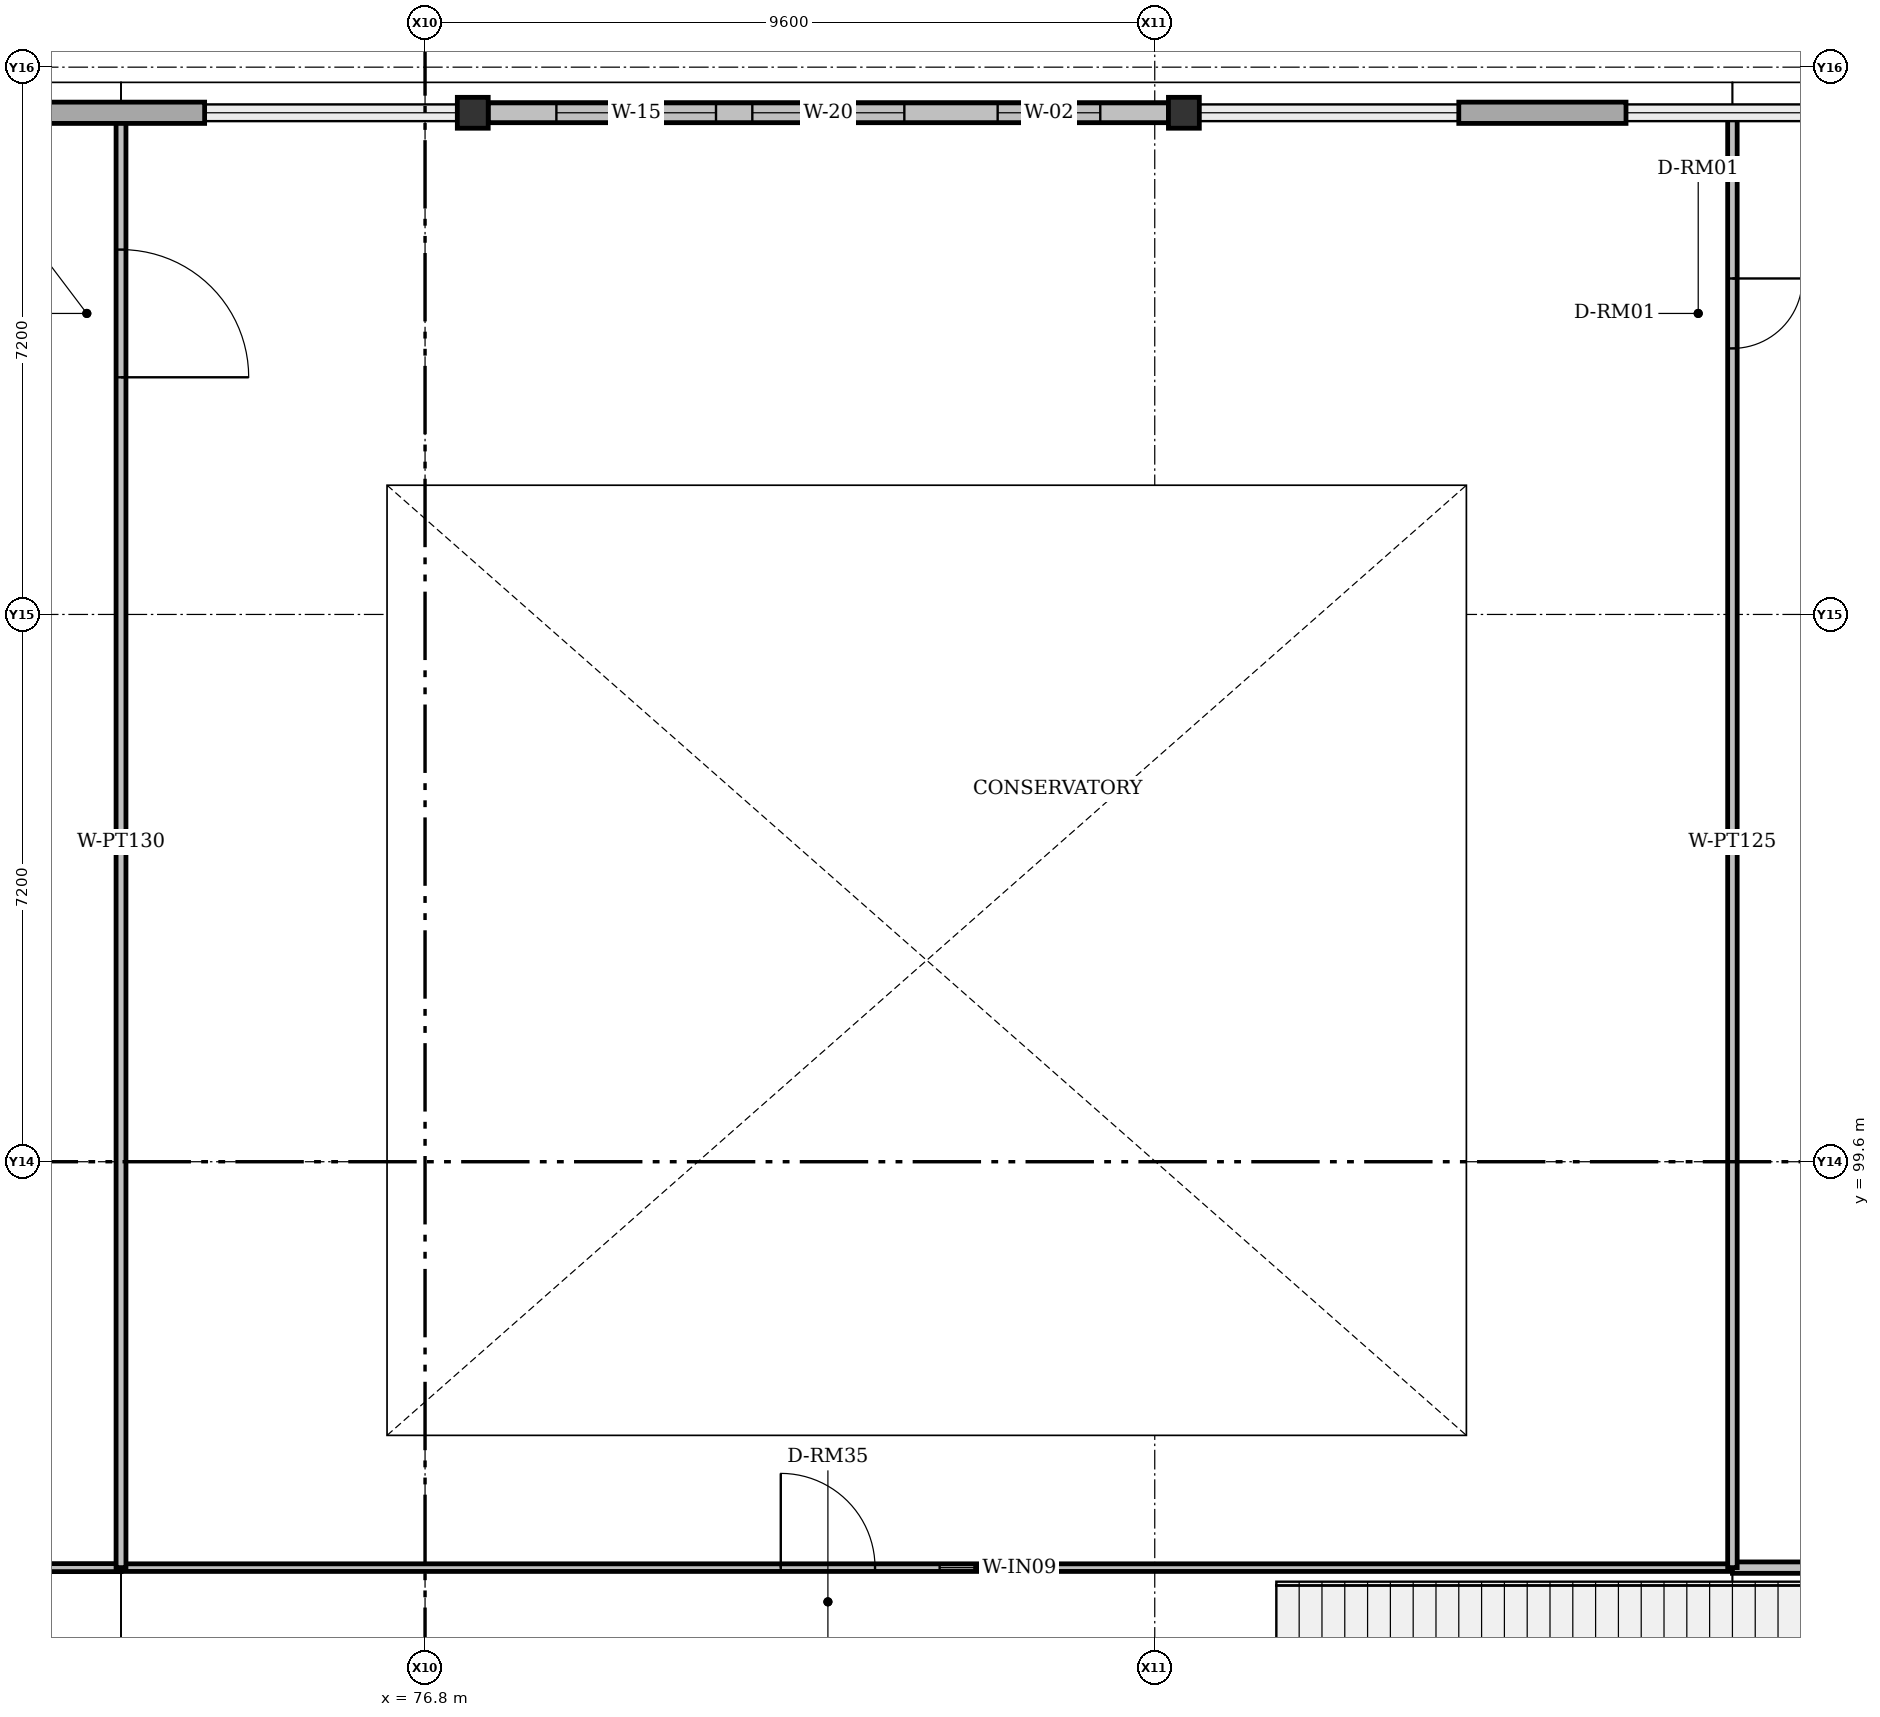
"""IFC4 building model, lengths in metres.
Left out: names, types, materials, properties, quantities, classifications, styles, units other than length and angle.
Written with IfcOpenShell. Run it as: python <this file> out.ifc"""

import sys

from ifc_helpers import new_model, si_unit, direction, frame, frame_2d, origin, origin_2d, place, context, subcontext, project, spatial, rectangle, hollow_circle, extrude, element, fill, save


model = new_model("IFC4")
c1 = context("Model", 3, precision=1e-05, world=origin(), true_north=direction((0.0, 1.0)))
c2 = subcontext(c1, "Body", "Model", "MODEL_VIEW")
j1 = project(units=[si_unit("LENGTHUNIT", "METRE"), si_unit("PLANEANGLEUNIT", "RADIAN")], contexts=[c1])
p1 = place(None, origin())
s1 = spatial("IfcSite", under=j1, at=p1, CompositionType="ELEMENT")
p2 = place(p1, origin())
s2 = spatial("IfcBuilding", under=s1, at=p2, CompositionType="ELEMENT")
p3 = place(p2, origin())
s3 = spatial("IfcBuildingStorey", under=s2, at=p3, CompositionType="ELEMENT", Elevation=0.0)
for number, where, z_axis, x_axis in (
    (1, (77.428, 113.4, 0.0), (0.0, 0.0, 1.0), (1.0, 0.0, 0.0)),
    (2, (86.783, 113.4, 0.0), (0.0, 0.0, 1.0), (1.0, 0.0, 0.0)),
):
    element("IfcColumn", number, at=place(p3, frame(where, z_axis=z_axis, x_axis=x_axis)), inside=s3, PredefinedType="COLUMN", context=c2, shape_type="SweptSolid", body=[
        extrude(hollow_circle(Radius=0.203, WallThickness=0.016, at=origin_2d()), origin(), (0.0, 0.0, 1.0), 5.4),
    ])
p4 = place(p3, frame((77.629, 113.4, 0.0), z_axis=(0.0, 0.0, 1.0), x_axis=(1.0, 0.0, 0.0)))
e3 = element("IfcWall", 3, at=p4, inside=s3, PredefinedType="SOLIDWALL", context=c2, shape_type="SweptSolid", body=[
    extrude(rectangle(XDim=8.953, YDim=0.26, at=frame_2d((4.477, 0.0))), origin(), (0.0, 0.0, 1.0), 3.383),
])
p5 = place(p4, frame((0.899, 0.0, 0.92)))
e4 = element("IfcOpeningElement", 4, at=p5, cuts=e3, PredefinedType="OPENING", context=c2, shape_type="SweptSolid", body=[
    extrude(rectangle(XDim=2.1, YDim=1.7, at=frame_2d((1.05, 0.85))), frame((0.0, 0.13, 0.0), z_axis=(0.0, -1.0, 0.0), x_axis=(1.0, 0.0, 0.0)), (0.0, 0.0, 1.0), 0.26),
])
p6 = place(p4, frame((6.704, 0.0, 0.92)))
e5 = element("IfcOpeningElement", 5, at=p6, cuts=e3, PredefinedType="OPENING", context=c2, shape_type="SweptSolid", body=[
    extrude(rectangle(XDim=1.35, YDim=1.4, at=frame_2d((0.675, 0.7))), frame((0.0, 0.13, 0.0), z_axis=(0.0, -1.0, 0.0), x_axis=(1.0, 0.0, 0.0)), (0.0, 0.0, 1.0), 0.26),
])
p7 = place(p3, frame((86.582, 113.4, 3.602), z_axis=(0.0, 0.0, 1.0), x_axis=(-1.0, 0.0, 0.0)))
e6 = element("IfcWall", 6, at=p7, inside=s3, PredefinedType="SOLIDWALL", context=c2, shape_type="SweptSolid", body=[
    extrude(rectangle(XDim=8.953, YDim=0.26, at=frame_2d((4.477, 0.0))), origin(), (0.0, 0.0, 1.0), 1.798),
])
p8 = place(p7, frame((3.477, 0.0, 0.22)))
e7 = element("IfcOpeningElement", 7, at=p8, cuts=e6, PredefinedType="OPENING", context=c2, shape_type="SweptSolid", body=[
    extrude(rectangle(XDim=2.0, YDim=1.35, at=frame_2d((1.0, 0.675))), frame((0.0, 0.13, 0.0), z_axis=(0.0, -1.0, 0.0), x_axis=(1.0, 0.0, 0.0)), (0.0, 0.0, 1.0), 0.26),
])
p9 = place(p3, frame((51.5, 94.26, 0.0), z_axis=(0.0, 0.0, 1.0), x_axis=(1.0, 0.0, 0.0)))
e8 = element("IfcWall", 8, at=p9, inside=s3, PredefinedType="PARTITIONING", context=c2, shape_type="SweptSolid", body=[
    extrude(rectangle(XDim=21.3, YDim=0.105, at=frame_2d((10.65, 0.0))), origin(), (0.0, 0.0, 1.0), 5.15),
])
p10 = place(p9, frame((11.33, 0.0, 0.0)))
e9 = element("IfcOpeningElement", 9, at=p10, cuts=e8, PredefinedType="OPENING", context=c2, shape_type="SweptSolid", body=[
    extrude(rectangle(XDim=1.14, YDim=2.18, at=frame_2d((0.57, 1.09))), frame((0.0, 0.052, 0.0), z_axis=(0.0, -1.0, 0.0), x_axis=(1.0, 0.0, 0.0)), (0.0, 0.0, 1.0), 0.105),
])
p11 = place(p9, frame((13.32, 0.0, 0.92)))
e10 = element("IfcOpeningElement", 10, at=p11, cuts=e8, PredefinedType="OPENING", context=c2, shape_type="SweptSolid", body=[
    extrude(rectangle(XDim=1.4, YDim=1.2, at=frame_2d((0.7, 0.6))), frame((0.0, 0.052, 0.0), z_axis=(0.0, -1.0, 0.0), x_axis=(1.0, 0.0, 0.0)), (0.0, 0.0, 1.0), 0.105),
])
p12 = place(p3, frame((72.8, 94.26, 0.0), z_axis=(0.0, 0.0, 1.0), x_axis=(1.0, 0.0, 0.0)))
e11 = element("IfcWall", 11, at=p12, inside=s3, PredefinedType="PARTITIONING", context=c2, shape_type="SweptSolid", body=[
    extrude(rectangle(XDim=21.2, YDim=0.1, at=frame_2d((10.6, 0.0))), origin(), (0.0, 0.0, 1.0), 5.15),
])
p13 = place(p12, frame((8.68, 0.0, 0.0)))
e12 = element("IfcOpeningElement", 12, at=p13, cuts=e11, PredefinedType="OPENING", context=c2, shape_type="SweptSolid", body=[
    extrude(rectangle(XDim=1.24, YDim=2.18, at=frame_2d((0.62, 1.09))), frame((0.0, 0.05, 0.0), z_axis=(0.0, -1.0, 0.0), x_axis=(1.0, 0.0, 0.0)), (0.0, 0.0, 1.0), 0.1),
])
p14 = place(p12, frame((10.77, 0.0, 0.92)))
e13 = element("IfcOpeningElement", 13, at=p14, cuts=e11, PredefinedType="OPENING", context=c2, shape_type="SweptSolid", body=[
    extrude(rectangle(XDim=1.0, YDim=1.3, at=frame_2d((0.5, 0.65))), frame((0.0, 0.05, 0.0), z_axis=(0.0, -1.0, 0.0), x_axis=(1.0, 0.0, 0.0)), (0.0, 0.0, 1.0), 0.1),
])
p15 = place(p3, frame((94.0, 94.26, 0.0), z_axis=(0.0, 0.0, 1.0), x_axis=(1.0, 0.0, 0.0)))
e14 = element("IfcWall", 14, at=p15, inside=s3, PredefinedType="PARTITIONING", context=c2, shape_type="SweptSolid", body=[
    extrude(rectangle(XDim=20.85, YDim=0.15, at=frame_2d((10.425, 0.0))), origin(), (0.0, 0.0, 1.0), 5.15),
])
p16 = place(p15, frame((6.14, 0.0, 0.0)))
e15 = element("IfcOpeningElement", 15, at=p16, cuts=e14, PredefinedType="OPENING", context=c2, shape_type="SweptSolid", body=[
    extrude(rectangle(XDim=1.32, YDim=2.18, at=frame_2d((0.66, 1.09))), frame((0.0, 0.075, 0.0), z_axis=(0.0, -1.0, 0.0), x_axis=(1.0, 0.0, 0.0)), (0.0, 0.0, 1.0), 0.15),
])
p17 = place(p15, frame((8.31, 0.0, 0.92)))
e16 = element("IfcOpeningElement", 16, at=p17, cuts=e14, PredefinedType="OPENING", context=c2, shape_type="SweptSolid", body=[
    extrude(rectangle(XDim=1.15, YDim=1.3, at=frame_2d((0.575, 0.65))), frame((0.0, 0.075, 0.0), z_axis=(0.0, -1.0, 0.0), x_axis=(1.0, 0.0, 0.0)), (0.0, 0.0, 1.0), 0.15),
])
p18 = place(p3, frame((72.8, 113.35, 0.0), z_axis=(0.0, 0.0, 1.0), x_axis=(0.0, -1.0, 0.0)))
e17 = element("IfcWall", 17, at=p18, inside=s3, PredefinedType="PARTITIONING", context=c2, shape_type="SweptSolid", body=[
    extrude(rectangle(XDim=19.09, YDim=0.13, at=frame_2d((9.545, 0.0))), origin(), (0.0, 0.0, 1.0), 5.15),
])
p19 = place(p18, frame((1.75, 0.0, 0.0)))
e18 = element("IfcOpeningElement", 18, at=p19, cuts=e17, PredefinedType="OPENING", context=c2, shape_type="SweptSolid", body=[
    extrude(rectangle(XDim=1.68, YDim=2.35, at=frame_2d((0.84, 1.175))), frame((0.0, 0.065, 0.0), z_axis=(0.0, -1.0, 0.0), x_axis=(1.0, 0.0, 0.0)), (0.0, 0.0, 1.0), 0.13),
])
p20 = place(p3, frame((94.0, 113.35, 0.0), z_axis=(0.0, 0.0, 1.0), x_axis=(0.0, -1.0, 0.0)))
e19 = element("IfcWall", 19, at=p20, inside=s3, PredefinedType="PARTITIONING", context=c2, shape_type="SweptSolid", body=[
    extrude(rectangle(XDim=19.09, YDim=0.125, at=frame_2d((9.545, 0.0))), origin(), (0.0, 0.0, 1.0), 5.15),
])
p21 = place(p20, frame((2.13, 0.0, 0.0)))
e20 = element("IfcOpeningElement", 20, at=p21, cuts=e19, PredefinedType="OPENING", context=c2, shape_type="SweptSolid", body=[
    extrude(rectangle(XDim=0.92, YDim=2.1, at=frame_2d((0.46, 1.05))), frame((0.0, 0.062, 0.0), z_axis=(0.0, -1.0, 0.0), x_axis=(1.0, 0.0, 0.0)), (0.0, 0.0, 1.0), 0.125),
])
p22 = place(p5, origin())
e21 = element("IfcWindow", 21, at=p22, inside=s3, PartitioningType="DOUBLE_PANEL_VERTICAL", PredefinedType="WINDOW", context=c2, shape_type="SweptSolid", body=[
    extrude(rectangle(XDim=2.1, YDim=1.7, at=frame_2d((1.05, 0.85))), frame((0.0, 0.03, 0.0), z_axis=(0.0, -1.0, 0.0), x_axis=(1.0, 0.0, 0.0)), (0.0, 0.0, 1.0), 0.06),
])
fill(e4, e21)
p23 = place(p6, origin())
e22 = element("IfcWindow", 22, at=p23, inside=s3, PartitioningType="SINGLE_PANEL", PredefinedType="WINDOW", context=c2, shape_type="SweptSolid", body=[
    extrude(rectangle(XDim=1.35, YDim=1.4, at=frame_2d((0.675, 0.7))), frame((0.0, 0.03, 0.0), z_axis=(0.0, -1.0, 0.0), x_axis=(1.0, 0.0, 0.0)), (0.0, 0.0, 1.0), 0.06),
])
fill(e5, e22)
p24 = place(p8, origin())
e23 = element("IfcWindow", 23, at=p24, inside=s3, PartitioningType="DOUBLE_PANEL_VERTICAL", PredefinedType="WINDOW", context=c2, shape_type="SweptSolid", body=[
    extrude(rectangle(XDim=2.0, YDim=1.35, at=frame_2d((1.0, 0.675))), frame((0.0, 0.03, 0.0), z_axis=(0.0, -1.0, 0.0), x_axis=(1.0, 0.0, 0.0)), (0.0, 0.0, 1.0), 0.06),
])
fill(e7, e23)
p25 = place(p13, origin())
e24 = element("IfcDoor", 24, at=p25, inside=s3, OperationType="SINGLE_SWING_LEFT", PredefinedType="DOOR", context=c2, shape_type="SweptSolid", body=[
    extrude(rectangle(XDim=1.24, YDim=2.18, at=frame_2d((0.62, 1.09))), frame((0.0, 0.025, 0.0), z_axis=(0.0, -1.0, 0.0), x_axis=(1.0, 0.0, 0.0)), (0.0, 0.0, 1.0), 0.05),
])
fill(e12, e24)
p26 = place(p14, origin())
e25 = element("IfcWindow", 25, at=p26, inside=s3, PartitioningType="SINGLE_PANEL", PredefinedType="WINDOW", context=c2, shape_type="SweptSolid", body=[
    extrude(rectangle(XDim=1.0, YDim=1.3, at=frame_2d((0.5, 0.65))), frame((0.0, 0.03, 0.0), z_axis=(0.0, -1.0, 0.0), x_axis=(1.0, 0.0, 0.0)), (0.0, 0.0, 1.0), 0.06),
])
fill(e13, e25)
p27 = place(p19, origin())
e26 = element("IfcDoor", 26, at=p27, inside=s3, OperationType="SINGLE_SWING_RIGHT", PredefinedType="DOOR", context=c2, shape_type="SweptSolid", body=[
    extrude(rectangle(XDim=1.68, YDim=2.35, at=frame_2d((0.84, 1.175))), frame((0.0, 0.025, 0.0), z_axis=(0.0, -1.0, 0.0), x_axis=(1.0, 0.0, 0.0)), (0.0, 0.0, 1.0), 0.05),
])
fill(e18, e26)
p28 = place(p21, origin())
e27 = element("IfcDoor", 27, at=p28, inside=s3, OperationType="SINGLE_SWING_LEFT", PredefinedType="DOOR", context=c2, shape_type="SweptSolid", body=[
    extrude(rectangle(XDim=0.92, YDim=2.1, at=frame_2d((0.46, 1.05))), frame((0.0, 0.025, 0.0), z_axis=(0.0, -1.0, 0.0), x_axis=(1.0, 0.0, 0.0)), (0.0, 0.0, 1.0), 0.05),
])
fill(e20, e27)
save(model, sys.argv[1])
